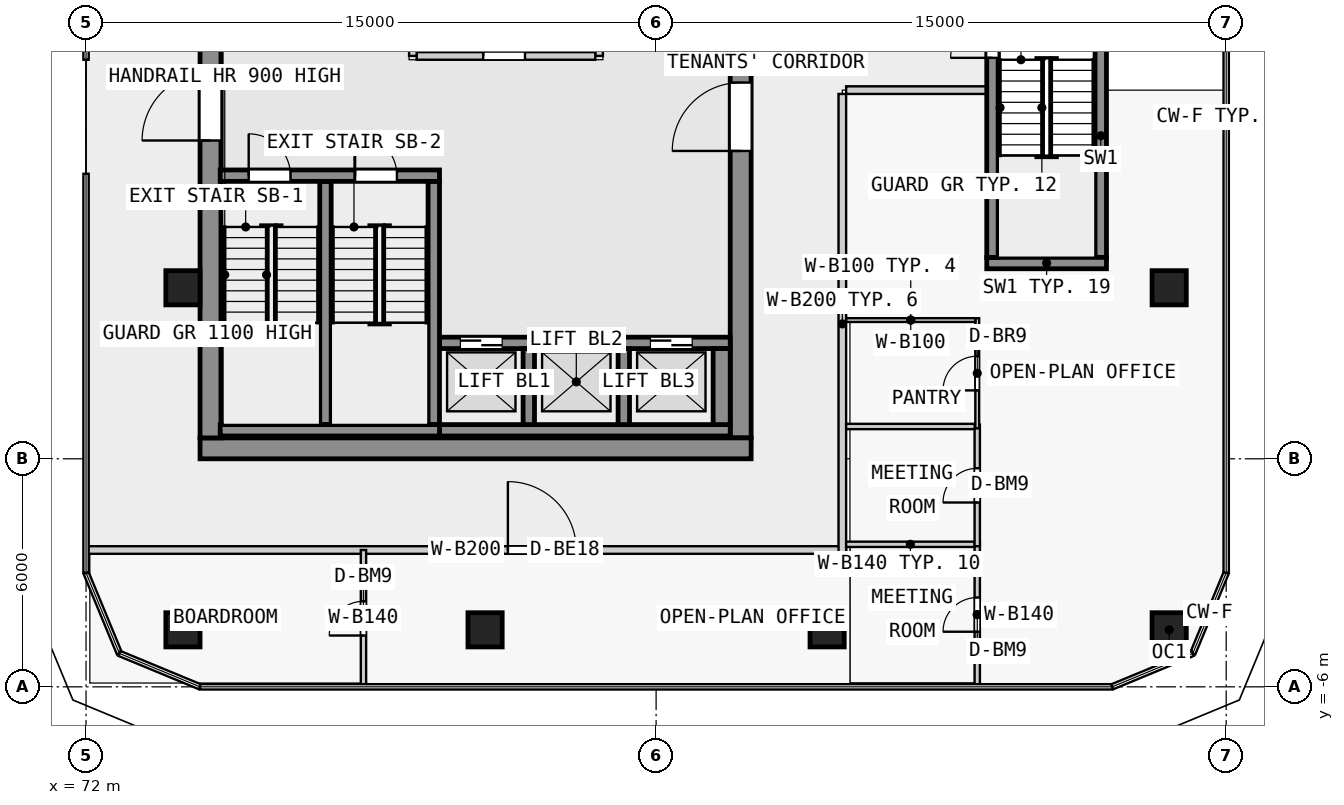
"""IFC4 building model, lengths in metres.
Left out: names, types, materials, properties, quantities, classifications, styles, units other than length and angle.
Written with IfcOpenShell. Run it as: python <this file> out.ifc"""

import sys

from ifc_helpers import new_model, si_unit, direction, frame, frame_2d, origin, origin_2d, place, context, subcontext, project, spatial, rectangle, extrude, element, fill, save


model = new_model("IFC4")
c1 = context("Model", 3, precision=1e-05, world=origin(), true_north=direction((0.0, 1.0)))
c2 = subcontext(c1, "Body", "Model", "MODEL_VIEW")
j1 = project(units=[si_unit("LENGTHUNIT", "METRE"), si_unit("PLANEANGLEUNIT", "RADIAN")], contexts=[c1])
p1 = place(None, origin())
s1 = spatial("IfcSite", under=j1, at=p1, CompositionType="ELEMENT")
p2 = place(p1, origin())
s2 = spatial("IfcBuilding", under=s1, at=p2, CompositionType="ELEMENT")
p3 = place(p2, frame((0.0, 0.0, 30.3)))
s3 = spatial("IfcBuildingStorey", under=s2, at=p3, CompositionType="ELEMENT", Elevation=30.3)
for number, where, z_axis, x_axis in (
    (1, (74.55, -4.5, 0.0), (0.0, 0.0, 1.0), (1.0, 0.0, 0.0)),
    (2, (82.5, -4.5, 0.0), (0.0, 0.0, 1.0), (1.0, 0.0, 0.0)),
    (3, (91.5, -4.5, 0.0), (0.0, 0.0, 1.0), (1.0, 0.0, 0.0)),
    (4, (100.5, -4.5, 0.0), (0.0, 0.0, 1.0), (1.0, 0.0, 0.0)),
    (5, (100.5, 4.5, 0.0), (0.0, 0.0, 1.0), (1.0, 0.0, 0.0)),
    (6, (74.55, 4.5, 0.0), (0.0, 0.0, 1.0), (1.0, 0.0, 0.0)),
):
    element("IfcColumn", number, at=place(p3, frame(where, z_axis=z_axis, x_axis=x_axis)), inside=s3, PredefinedType="COLUMN", context=c2, shape_type="SweptSolid", body=[
        extrude(rectangle(XDim=0.9, YDim=0.9, at=origin_2d()), origin(), (0.0, 0.0, 1.0), 3.5),
    ])
p4 = place(p3, frame((75.0, 0.275, 0.0), z_axis=(0.0, 0.0, 1.0), x_axis=(1.0, 0.0, 0.0)))
e7 = element("IfcWall", 7, at=p4, inside=s3, PredefinedType="SHEAR", context=c2, shape_type="SweptSolid", body=[
    extrude(rectangle(XDim=14.5, YDim=0.55, at=frame_2d((7.25, 0.0))), origin(), (0.0, 0.0, 1.0), 3.25),
])
p5 = place(p3, frame((75.275, 0.55, 0.0), z_axis=(0.0, 0.0, 1.0), x_axis=(0.0, 1.0, 0.0)))
e8 = element("IfcWall", 8, at=p5, inside=s3, PredefinedType="SHEAR", context=c2, shape_type="SweptSolid", body=[
    extrude(rectangle(XDim=16.9, YDim=0.55, at=frame_2d((8.45, 0.0))), origin(), (0.0, 0.0, 1.0), 3.25),
])
p6 = place(p5, frame((7.825, 0.0, 0.0)))
e9 = element("IfcOpeningElement", 9, at=p6, cuts=e8, PredefinedType="OPENING", context=c2, shape_type="SweptSolid", body=[
    extrude(rectangle(XDim=1.8, YDim=2.1, at=frame_2d((0.9, 1.05))), frame((0.0, 0.285, 0.0), z_axis=(0.0, -1.0, 0.0), x_axis=(1.0, 0.0, 0.0)), (0.0, 0.0, 1.0), 0.57),
])
p7 = place(p3, frame((89.225, 0.55, 0.0), z_axis=(0.0, 0.0, 1.0), x_axis=(0.0, 1.0, 0.0)))
e10 = element("IfcWall", 10, at=p7, inside=s3, PredefinedType="SHEAR", context=c2, shape_type="SweptSolid", body=[
    extrude(rectangle(XDim=16.9, YDim=0.55, at=frame_2d((8.45, 0.0))), origin(), (0.0, 0.0, 1.0), 3.25),
])
p8 = place(p7, frame((7.55, 0.0, 0.0)))
e11 = element("IfcOpeningElement", 11, at=p8, cuts=e10, PredefinedType="OPENING", context=c2, shape_type="SweptSolid", body=[
    extrude(rectangle(XDim=1.8, YDim=2.1, at=frame_2d((0.9, 1.05))), frame((0.0, 0.285, 0.0), z_axis=(0.0, -1.0, 0.0), x_axis=(1.0, 0.0, 0.0)), (0.0, 0.0, 1.0), 0.57),
])
p9 = place(p3, frame((75.53, 0.75, 0.0), z_axis=(0.0, 0.0, 1.0), x_axis=(1.0, 0.0, 0.0)))
e12 = element("IfcWall", 12, at=p9, inside=s3, PredefinedType="SHEAR", context=c2, shape_type="SweptSolid", body=[
    extrude(rectangle(XDim=5.77, YDim=0.3, at=frame_2d((2.885, 0.0))), origin(), (0.0, 0.0, 1.0), 3.25),
])
p10 = place(p3, frame((75.53, 7.45, 0.0), z_axis=(0.0, 0.0, 1.0), x_axis=(1.0, 0.0, 0.0)))
e13 = element("IfcWall", 13, at=p10, inside=s3, PredefinedType="SHEAR", context=c2, shape_type="SweptSolid", body=[
    extrude(rectangle(XDim=5.77, YDim=0.3, at=frame_2d((2.885, 0.0))), origin(), (0.0, 0.0, 1.0), 3.25),
])
p11 = place(p10, frame((0.75, 0.0, 0.0)))
e14 = element("IfcOpeningElement", 14, at=p11, cuts=e13, PredefinedType="OPENING", context=c2, shape_type="SweptSolid", body=[
    extrude(rectangle(XDim=1.1, YDim=2.1, at=frame_2d((0.55, 1.05))), frame((0.0, 0.16, 0.0), z_axis=(0.0, -1.0, 0.0), x_axis=(1.0, 0.0, 0.0)), (0.0, 0.0, 1.0), 0.32),
])
p12 = place(p10, frame((3.55, 0.0, 0.0)))
e15 = element("IfcOpeningElement", 15, at=p12, cuts=e13, PredefinedType="OPENING", context=c2, shape_type="SweptSolid", body=[
    extrude(rectangle(XDim=1.1, YDim=2.1, at=frame_2d((0.55, 1.05))), frame((0.0, 0.16, 0.0), z_axis=(0.0, -1.0, 0.0), x_axis=(1.0, 0.0, 0.0)), (0.0, 0.0, 1.0), 0.32),
])
for number, where, z_axis, x_axis in (
    (16, (78.3, 0.9, 0.0), (0.0, 0.0, 1.0), (0.0, 1.0, 0.0)),
    (17, (81.15, 0.9, 0.0), (0.0, 0.0, 1.0), (0.0, 1.0, 0.0)),
):
    element("IfcWall", number, at=place(p3, frame(where, z_axis=z_axis, x_axis=x_axis)), inside=s3, PredefinedType="SHEAR", context=c2, shape_type="SweptSolid", body=[
        extrude(rectangle(XDim=6.4, YDim=0.3, at=frame_2d((3.2, 0.0))), origin(), (0.0, 0.0, 1.0), 3.25),
    ])
p13 = place(p3, frame((81.3, 0.75, 0.0), z_axis=(0.0, 0.0, 1.0), x_axis=(1.0, 0.0, 0.0)))
e18 = element("IfcWall", 18, at=p13, inside=s3, PredefinedType="SHEAR", context=c2, shape_type="SweptSolid", body=[
    extrude(rectangle(XDim=7.65, YDim=0.3, at=frame_2d((3.825, 0.0))), origin(), (0.0, 0.0, 1.0), 3.25),
])
for number, where, z_axis, x_axis in (
    (19, (83.65, 0.9, 0.0), (0.0, 0.0, 1.0), (0.0, 1.0, 0.0)),
    (20, (86.15, 0.9, 0.0), (0.0, 0.0, 1.0), (0.0, 1.0, 0.0)),
):
    element("IfcWall", number, at=place(p3, frame(where, z_axis=z_axis, x_axis=x_axis)), inside=s3, PredefinedType="SHEAR", context=c2, shape_type="SweptSolid", body=[
        extrude(rectangle(XDim=2.0, YDim=0.3, at=frame_2d((1.0, 0.0))), origin(), (0.0, 0.0, 1.0), 3.25),
    ])
p14 = place(p3, frame((88.725, 0.9, 0.0), z_axis=(0.0, 0.0, 1.0), x_axis=(0.0, 1.0, 0.0)))
e21 = element("IfcWall", 21, at=p14, inside=s3, PredefinedType="SHEAR", context=c2, shape_type="SweptSolid", body=[
    extrude(rectangle(XDim=2.0, YDim=0.45, at=frame_2d((1.0, 0.0))), origin(), (0.0, 0.0, 1.0), 3.25),
])
p15 = place(p3, frame((81.3, 3.05, 0.0), z_axis=(0.0, 0.0, 1.0), x_axis=(1.0, 0.0, 0.0)))
e22 = element("IfcWall", 22, at=p15, inside=s3, PredefinedType="SHEAR", context=c2, shape_type="SweptSolid", body=[
    extrude(rectangle(XDim=7.65, YDim=0.3, at=frame_2d((3.825, 0.0))), origin(), (0.0, 0.0, 1.0), 3.25),
])
p16 = place(p15, frame((0.55, 0.0, 0.0)))
e23 = element("IfcOpeningElement", 23, at=p16, cuts=e22, PredefinedType="OPENING", context=c2, shape_type="SweptSolid", body=[
    extrude(rectangle(XDim=1.1, YDim=2.1, at=frame_2d((0.55, 1.05))), frame((0.0, 0.16, 0.0), z_axis=(0.0, -1.0, 0.0), x_axis=(1.0, 0.0, 0.0)), (0.0, 0.0, 1.0), 0.32),
])
p17 = place(p15, frame((3.05, 0.0, 0.0)))
e24 = element("IfcOpeningElement", 24, at=p17, cuts=e22, PredefinedType="OPENING", context=c2, shape_type="SweptSolid", body=[
    extrude(rectangle(XDim=1.1, YDim=2.1, at=frame_2d((0.55, 1.05))), frame((0.0, 0.16, 0.0), z_axis=(0.0, -1.0, 0.0), x_axis=(1.0, 0.0, 0.0)), (0.0, 0.0, 1.0), 0.32),
])
p18 = place(p15, frame((5.55, 0.0, 0.0)))
e25 = element("IfcOpeningElement", 25, at=p18, cuts=e22, PredefinedType="OPENING", context=c2, shape_type="SweptSolid", body=[
    extrude(rectangle(XDim=1.1, YDim=2.1, at=frame_2d((0.55, 1.05))), frame((0.0, 0.16, 0.0), z_axis=(0.0, -1.0, 0.0), x_axis=(1.0, 0.0, 0.0)), (0.0, 0.0, 1.0), 0.32),
])
p19 = place(p3, frame((95.85, 5.3, 0.0), z_axis=(0.0, 0.0, 1.0), x_axis=(0.0, 1.0, 0.0)))
e26 = element("IfcWall", 26, at=p19, inside=s3, PredefinedType="SHEAR", context=c2, shape_type="SweptSolid", body=[
    extrude(rectangle(XDim=6.4, YDim=0.3, at=frame_2d((3.2, 0.0))), origin(), (0.0, 0.0, 1.0), 3.25),
])
p20 = place(p19, frame((5.25, 0.0, 0.0)))
e27 = element("IfcOpeningElement", 27, at=p20, cuts=e26, PredefinedType="OPENING", context=c2, shape_type="SweptSolid", body=[
    extrude(rectangle(XDim=1.1, YDim=2.1, at=frame_2d((0.55, 1.05))), frame((0.0, 0.16, 0.0), z_axis=(0.0, -1.0, 0.0), x_axis=(1.0, 0.0, 0.0)), (0.0, 0.0, 1.0), 0.32),
])
p21 = place(p3, frame((98.7, 5.3, 0.0), z_axis=(0.0, 0.0, 1.0), x_axis=(0.0, 1.0, 0.0)))
e28 = element("IfcWall", 28, at=p21, inside=s3, PredefinedType="SHEAR", context=c2, shape_type="SweptSolid", body=[
    extrude(rectangle(XDim=6.4, YDim=0.3, at=frame_2d((3.2, 0.0))), origin(), (0.0, 0.0, 1.0), 3.25),
])
p22 = place(p3, frame((95.7, 5.15, 0.0), z_axis=(0.0, 0.0, 1.0), x_axis=(1.0, 0.0, 0.0)))
e29 = element("IfcWall", 29, at=p22, inside=s3, PredefinedType="SHEAR", context=c2, shape_type="SweptSolid", body=[
    extrude(rectangle(XDim=3.15, YDim=0.3, at=frame_2d((1.575, 0.0))), origin(), (0.0, 0.0, 1.0), 3.25),
])
p23 = place(p3, frame((80.6, 10.6, 0.0), z_axis=(0.0, 0.0, 1.0), x_axis=(0.0, 1.0, 0.0)))
e30 = element("IfcWall", 30, at=p23, inside=s3, PredefinedType="PARTITIONING", context=c2, shape_type="SweptSolid", body=[
    extrude(rectangle(XDim=3.4, YDim=0.2, at=frame_2d((1.7, 0.0))), origin(), (0.0, 0.0, 1.0), 3.25),
])
p24 = place(p3, frame((80.7, 10.6, 0.0), z_axis=(0.0, 0.0, 1.0), x_axis=(1.0, 0.0, 0.0)))
e31 = element("IfcWall", 31, at=p24, inside=s3, PredefinedType="PARTITIONING", context=c2, shape_type="SweptSolid", body=[
    extrude(rectangle(XDim=4.7, YDim=0.2, at=frame_2d((2.35, 0.0))), origin(), (0.0, 0.0, 1.0), 3.25),
])
p25 = place(p24, frame((1.75, 0.0, 0.0)))
e32 = element("IfcOpeningElement", 32, at=p25, cuts=e31, PredefinedType="OPENING", context=c2, shape_type="SweptSolid", body=[
    extrude(rectangle(XDim=1.1, YDim=2.1, at=frame_2d((0.55, 1.05))), frame((0.0, 0.11, 0.0), z_axis=(0.0, -1.0, 0.0), x_axis=(1.0, 0.0, 0.0)), (0.0, 0.0, 1.0), 0.22),
])
p26 = place(p3, frame((85.5, 10.6, 0.0), z_axis=(0.0, 0.0, 1.0), x_axis=(0.0, 1.0, 0.0)))
e33 = element("IfcWall", 33, at=p26, inside=s3, PredefinedType="PARTITIONING", context=c2, shape_type="SweptSolid", body=[
    extrude(rectangle(XDim=3.4, YDim=0.2, at=frame_2d((1.7, 0.0))), origin(), (0.0, 0.0, 1.0), 3.25),
])
p27 = place(p3, frame((72.0, -2.4, 0.0), z_axis=(0.0, 0.0, 1.0), x_axis=(1.0, 0.0, 0.0)))
e34 = element("IfcWall", 34, at=p27, inside=s3, PredefinedType="PARTITIONING", context=c2, shape_type="SweptSolid", body=[
    extrude(rectangle(XDim=20.0, YDim=0.2, at=frame_2d((10.0, 0.0))), origin(), (0.0, 0.0, 1.0), 3.25),
])
p28 = place(p27, frame((11.1, 0.0, 0.0)))
e35 = element("IfcOpeningElement", 35, at=p28, cuts=e34, PredefinedType="OPENING", context=c2, shape_type="SweptSolid", body=[
    extrude(rectangle(XDim=1.8, YDim=2.1, at=frame_2d((0.9, 1.05))), frame((0.0, 0.11, 0.0), z_axis=(0.0, -1.0, 0.0), x_axis=(1.0, 0.0, 0.0)), (0.0, 0.0, 1.0), 0.22),
])
p29 = place(p3, frame((91.9, -2.5, 0.0), z_axis=(0.0, 0.0, 1.0), x_axis=(0.0, 1.0, 0.0)))
e36 = element("IfcWall", 36, at=p29, inside=s3, PredefinedType="PARTITIONING", context=c2, shape_type="SweptSolid", body=[
    extrude(rectangle(XDim=12.1, YDim=0.2, at=frame_2d((6.05, 0.0))), origin(), (0.0, 0.0, 1.0), 3.25),
])
p30 = place(p3, frame((92.0, 9.7, 0.0), z_axis=(0.0, 0.0, 1.0), x_axis=(1.0, 0.0, 0.0)))
e37 = element("IfcWall", 37, at=p30, inside=s3, PredefinedType="PARTITIONING", context=c2, shape_type="SweptSolid", body=[
    extrude(rectangle(XDim=3.7, YDim=0.2, at=frame_2d((1.85, 0.0))), origin(), (0.0, 0.0, 1.0), 3.25),
])
p31 = place(p3, frame((79.3, -6.0, 0.0), z_axis=(0.0, 0.0, 1.0), x_axis=(0.0, 1.0, 0.0)))
e38 = element("IfcWall", 38, at=p31, inside=s3, PredefinedType="PARTITIONING", context=c2, shape_type="SweptSolid", body=[
    extrude(rectangle(XDim=3.6, YDim=0.14, at=frame_2d((1.8, 0.0))), origin(), (0.0, 0.0, 1.0), 3.25),
])
p32 = place(p31, frame((1.35, 0.0, 0.0)))
e39 = element("IfcOpeningElement", 39, at=p32, cuts=e38, PredefinedType="OPENING", context=c2, shape_type="SweptSolid", body=[
    extrude(rectangle(XDim=0.9, YDim=2.4, at=frame_2d((0.45, 1.2))), frame((0.0, 0.08, 0.0), z_axis=(0.0, -1.0, 0.0), x_axis=(1.0, 0.0, 0.0)), (0.0, 0.0, 1.0), 0.16),
])
p33 = place(p3, frame((95.45, -6.0, 0.0), z_axis=(0.0, 0.0, 1.0), x_axis=(0.0, 1.0, 0.0)))
e40 = element("IfcWall", 40, at=p33, inside=s3, PredefinedType="PARTITIONING", context=c2, shape_type="SweptSolid", body=[
    extrude(rectangle(XDim=3.8, YDim=0.14, at=frame_2d((1.9, 0.0))), origin(), (0.0, 0.0, 1.0), 3.25),
])
p34 = place(p33, frame((1.45, 0.0, 0.0)))
e41 = element("IfcOpeningElement", 41, at=p34, cuts=e40, PredefinedType="OPENING", context=c2, shape_type="SweptSolid", body=[
    extrude(rectangle(XDim=0.9, YDim=2.4, at=frame_2d((0.45, 1.2))), frame((0.0, 0.08, 0.0), z_axis=(0.0, -1.0, 0.0), x_axis=(1.0, 0.0, 0.0)), (0.0, 0.0, 1.0), 0.16),
])
p35 = place(p3, frame((92.0, -2.25, 0.0), z_axis=(0.0, 0.0, 1.0), x_axis=(1.0, 0.0, 0.0)))
e42 = element("IfcWall", 42, at=p35, inside=s3, PredefinedType="PARTITIONING", context=c2, shape_type="SweptSolid", body=[
    extrude(rectangle(XDim=3.38, YDim=0.14, at=frame_2d((1.69, 0.0))), origin(), (0.0, 0.0, 1.0), 3.25),
])
p36 = place(p3, frame((95.45, -2.3, 0.0), z_axis=(0.0, 0.0, 1.0), x_axis=(0.0, 1.0, 0.0)))
e43 = element("IfcWall", 43, at=p36, inside=s3, PredefinedType="PARTITIONING", context=c2, shape_type="SweptSolid", body=[
    extrude(rectangle(XDim=3.2, YDim=0.14, at=frame_2d((1.6, 0.0))), origin(), (0.0, 0.0, 1.0), 3.25),
])
p37 = place(p36, frame((1.15, 0.0, 0.0)))
e44 = element("IfcOpeningElement", 44, at=p37, cuts=e43, PredefinedType="OPENING", context=c2, shape_type="SweptSolid", body=[
    extrude(rectangle(XDim=0.9, YDim=2.4, at=frame_2d((0.45, 1.2))), frame((0.0, 0.08, 0.0), z_axis=(0.0, -1.0, 0.0), x_axis=(1.0, 0.0, 0.0)), (0.0, 0.0, 1.0), 0.16),
])
p38 = place(p3, frame((92.0, 0.85, 0.0), z_axis=(0.0, 0.0, 1.0), x_axis=(1.0, 0.0, 0.0)))
e45 = element("IfcWall", 45, at=p38, inside=s3, PredefinedType="PARTITIONING", context=c2, shape_type="SweptSolid", body=[
    extrude(rectangle(XDim=3.38, YDim=0.14, at=frame_2d((1.69, 0.0))), origin(), (0.0, 0.0, 1.0), 3.25),
])
p39 = place(p3, frame((95.45, 0.8, 0.0), z_axis=(0.0, 0.0, 1.0), x_axis=(0.0, 1.0, 0.0)))
e46 = element("IfcWall", 46, at=p39, inside=s3, PredefinedType="PARTITIONING", context=c2, shape_type="SweptSolid", body=[
    extrude(rectangle(XDim=2.9, YDim=0.1, at=frame_2d((1.45, 0.0))), origin(), (0.0, 0.0, 1.0), 3.25),
])
p40 = place(p39, frame((1.0, 0.0, 0.0)))
e47 = element("IfcOpeningElement", 47, at=p40, cuts=e46, PredefinedType="OPENING", context=c2, shape_type="SweptSolid", body=[
    extrude(rectangle(XDim=0.9, YDim=2.1, at=frame_2d((0.45, 1.05))), frame((0.0, 0.06, 0.0), z_axis=(0.0, -1.0, 0.0), x_axis=(1.0, 0.0, 0.0)), (0.0, 0.0, 1.0), 0.12),
])
p41 = place(p3, frame((92.0, 3.65, 0.0), z_axis=(0.0, 0.0, 1.0), x_axis=(1.0, 0.0, 0.0)))
e48 = element("IfcWall", 48, at=p41, inside=s3, PredefinedType="PARTITIONING", context=c2, shape_type="SweptSolid", body=[
    extrude(rectangle(XDim=3.4, YDim=0.1, at=frame_2d((1.7, 0.0))), origin(), (0.0, 0.0, 1.0), 3.25),
])
p42 = place(p25, origin())
e49 = element("IfcDoor", 49, at=p42, inside=s3, OperationType="SINGLE_SWING_LEFT", PredefinedType="DOOR", context=c2, shape_type="SweptSolid", body=[
    extrude(rectangle(XDim=1.1, YDim=2.1, at=frame_2d((0.55, 1.05))), frame((0.0, 0.025, 0.0), z_axis=(0.0, -1.0, 0.0), x_axis=(1.0, 0.0, 0.0)), (0.0, 0.0, 1.0), 0.05),
])
fill(e32, e49)
p43 = place(p16, origin())
e50 = element("IfcDoor", 50, at=p43, inside=s3, OperationType="DOUBLE_DOOR_SLIDING", PredefinedType="DOOR", context=c2, shape_type="SweptSolid", body=[
    extrude(rectangle(XDim=1.1, YDim=2.1, at=frame_2d((0.55, 1.05))), frame((0.0, 0.025, 0.0), z_axis=(0.0, -1.0, 0.0), x_axis=(1.0, 0.0, 0.0)), (0.0, 0.0, 1.0), 0.05),
])
fill(e23, e50)
p44 = place(p17, origin())
e51 = element("IfcDoor", 51, at=p44, inside=s3, OperationType="DOUBLE_DOOR_SLIDING", PredefinedType="DOOR", context=c2, shape_type="SweptSolid", body=[
    extrude(rectangle(XDim=1.1, YDim=2.1, at=frame_2d((0.55, 1.05))), frame((0.0, 0.025, 0.0), z_axis=(0.0, -1.0, 0.0), x_axis=(1.0, 0.0, 0.0)), (0.0, 0.0, 1.0), 0.05),
])
fill(e24, e51)
p45 = place(p18, origin())
e52 = element("IfcDoor", 52, at=p45, inside=s3, OperationType="DOUBLE_DOOR_SLIDING", PredefinedType="DOOR", context=c2, shape_type="SweptSolid", body=[
    extrude(rectangle(XDim=1.1, YDim=2.1, at=frame_2d((0.55, 1.05))), frame((0.0, 0.025, 0.0), z_axis=(0.0, -1.0, 0.0), x_axis=(1.0, 0.0, 0.0)), (0.0, 0.0, 1.0), 0.05),
])
fill(e25, e52)
p46 = place(p11, origin())
e53 = element("IfcDoor", 53, at=p46, inside=s3, OperationType="SINGLE_SWING_RIGHT", PredefinedType="DOOR", context=c2, shape_type="SweptSolid", body=[
    extrude(rectangle(XDim=1.1, YDim=2.1, at=frame_2d((0.55, 1.05))), frame((0.0, 0.025, 0.0), z_axis=(0.0, -1.0, 0.0), x_axis=(1.0, 0.0, 0.0)), (0.0, 0.0, 1.0), 0.05),
])
fill(e14, e53)
p47 = place(p12, origin())
e54 = element("IfcDoor", 54, at=p47, inside=s3, OperationType="SINGLE_SWING_LEFT", PredefinedType="DOOR", context=c2, shape_type="SweptSolid", body=[
    extrude(rectangle(XDim=1.1, YDim=2.1, at=frame_2d((0.55, 1.05))), frame((0.0, 0.025, 0.0), z_axis=(0.0, -1.0, 0.0), x_axis=(1.0, 0.0, 0.0)), (0.0, 0.0, 1.0), 0.05),
])
fill(e15, e54)
p48 = place(p20, origin())
e55 = element("IfcDoor", 55, at=p48, inside=s3, OperationType="SINGLE_SWING_LEFT", PredefinedType="DOOR", context=c2, shape_type="SweptSolid", body=[
    extrude(rectangle(XDim=1.1, YDim=2.1, at=frame_2d((0.55, 1.05))), frame((0.0, 0.025, 0.0), z_axis=(0.0, -1.0, 0.0), x_axis=(1.0, 0.0, 0.0)), (0.0, 0.0, 1.0), 0.05),
])
fill(e27, e55)
p49 = place(p6, origin())
e56 = element("IfcDoor", 56, at=p49, inside=s3, OperationType="DOUBLE_DOOR_SINGLE_SWING", PredefinedType="DOOR", context=c2, shape_type="SweptSolid", body=[
    extrude(rectangle(XDim=1.8, YDim=2.1, at=frame_2d((0.9, 1.05))), frame((0.0, 0.025, 0.0), z_axis=(0.0, -1.0, 0.0), x_axis=(1.0, 0.0, 0.0)), (0.0, 0.0, 1.0), 0.05),
])
fill(e9, e56)
p50 = place(p8, origin())
e57 = element("IfcDoor", 57, at=p50, inside=s3, OperationType="DOUBLE_DOOR_SINGLE_SWING", PredefinedType="DOOR", context=c2, shape_type="SweptSolid", body=[
    extrude(rectangle(XDim=1.8, YDim=2.1, at=frame_2d((0.9, 1.05))), frame((0.0, 0.025, 0.0), z_axis=(0.0, -1.0, 0.0), x_axis=(1.0, 0.0, 0.0)), (0.0, 0.0, 1.0), 0.05),
])
fill(e11, e57)
p51 = place(p28, origin())
e58 = element("IfcDoor", 58, at=p51, inside=s3, OperationType="DOUBLE_DOOR_SINGLE_SWING", PredefinedType="DOOR", context=c2, shape_type="SweptSolid", body=[
    extrude(rectangle(XDim=1.8, YDim=2.1, at=frame_2d((0.9, 1.05))), frame((0.0, 0.025, 0.0), z_axis=(0.0, -1.0, 0.0), x_axis=(1.0, 0.0, 0.0)), (0.0, 0.0, 1.0), 0.05),
])
fill(e35, e58)
p52 = place(p32, origin())
e59 = element("IfcDoor", 59, at=p52, inside=s3, OperationType="SINGLE_SWING_LEFT", PredefinedType="DOOR", context=c2, shape_type="SweptSolid", body=[
    extrude(rectangle(XDim=0.9, YDim=2.4, at=frame_2d((0.45, 1.2))), frame((0.0, 0.025, 0.0), z_axis=(0.0, -1.0, 0.0), x_axis=(1.0, 0.0, 0.0)), (0.0, 0.0, 1.0), 0.05),
])
fill(e39, e59)
p53 = place(p34, origin())
e60 = element("IfcDoor", 60, at=p53, inside=s3, OperationType="SINGLE_SWING_LEFT", PredefinedType="DOOR", context=c2, shape_type="SweptSolid", body=[
    extrude(rectangle(XDim=0.9, YDim=2.4, at=frame_2d((0.45, 1.2))), frame((0.0, 0.025, 0.0), z_axis=(0.0, -1.0, 0.0), x_axis=(1.0, 0.0, 0.0)), (0.0, 0.0, 1.0), 0.05),
])
fill(e41, e60)
p54 = place(p37, origin())
e61 = element("IfcDoor", 61, at=p54, inside=s3, OperationType="SINGLE_SWING_LEFT", PredefinedType="DOOR", context=c2, shape_type="SweptSolid", body=[
    extrude(rectangle(XDim=0.9, YDim=2.4, at=frame_2d((0.45, 1.2))), frame((0.0, 0.025, 0.0), z_axis=(0.0, -1.0, 0.0), x_axis=(1.0, 0.0, 0.0)), (0.0, 0.0, 1.0), 0.05),
])
fill(e44, e61)
p55 = place(p40, origin())
e62 = element("IfcDoor", 62, at=p55, inside=s3, OperationType="SINGLE_SWING_LEFT", PredefinedType="DOOR", context=c2, shape_type="SweptSolid", body=[
    extrude(rectangle(XDim=0.9, YDim=2.1, at=frame_2d((0.45, 1.05))), frame((0.0, 0.025, 0.0), z_axis=(0.0, -1.0, 0.0), x_axis=(1.0, 0.0, 0.0)), (0.0, 0.0, 1.0), 0.05),
])
fill(e47, e62)
save(model, sys.argv[1])
